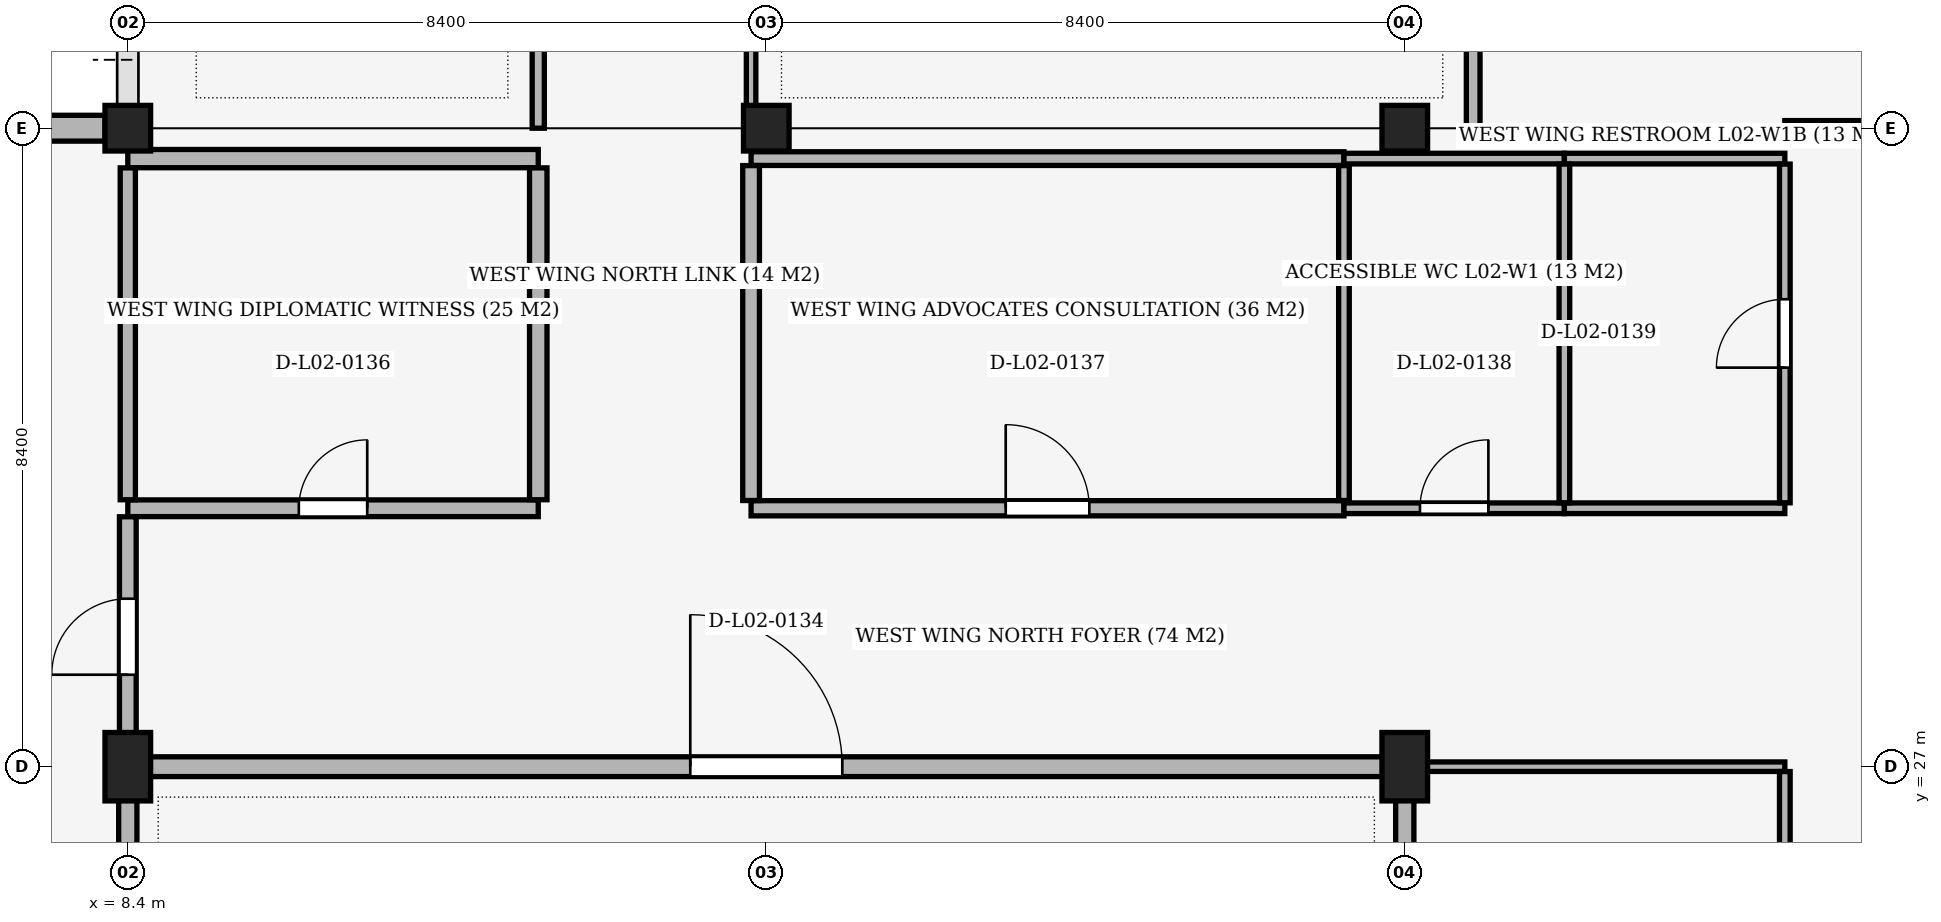
"""IFC4 building model, lengths in metres.
Left out: names, types, materials, properties, quantities, classifications, styles, units other than length and angle.
Written with IfcOpenShell. Run it as: python <this file> out.ifc"""

import sys

from ifc_helpers import new_model, si_unit, direction, frame, frame_2d, origin, origin_2d, place, context, subcontext, project, spatial, rectangle, extrude, element, fill, save


model = new_model("IFC4")
c1 = context("Model", 3, precision=1e-05, world=origin(), true_north=direction((0.0, 1.0)))
c2 = subcontext(c1, "Body", "Model", "MODEL_VIEW")
j1 = project(units=[si_unit("LENGTHUNIT", "METRE"), si_unit("PLANEANGLEUNIT", "RADIAN")], contexts=[c1])
p1 = place(None, origin())
s1 = spatial("IfcSite", under=j1, at=p1, CompositionType="ELEMENT")
p2 = place(p1, origin())
s2 = spatial("IfcBuilding", under=s1, at=p2, CompositionType="ELEMENT")
p3 = place(p2, frame((0.0, 0.0, 10.2)))
s3 = spatial("IfcBuildingStorey", under=s2, at=p3, CompositionType="ELEMENT", Elevation=10.2)
p4 = place(p3, frame((8.4, 27.0, 0.0), z_axis=(0.0, 0.0, 1.0), x_axis=(1.0, 0.0, 0.0)))
e1 = element("IfcColumn", 1, at=p4, inside=s3, PredefinedType="COLUMN", context=c2, shape_type="SweptSolid", body=[
    extrude(rectangle(XDim=0.6, YDim=0.9, at=origin_2d()), origin(), (0.0, 0.0, 1.0), 5.1),
])
for number, where, z_axis, x_axis in (
    (2, (8.4, 35.4, 0.0), (0.0, 0.0, 1.0), (1.0, 0.0, 0.0)),
    (3, (16.8, 35.4, 0.0), (0.0, 0.0, 1.0), (1.0, 0.0, 0.0)),
):
    element("IfcColumn", number, at=place(p3, frame(where, z_axis=z_axis, x_axis=x_axis)), inside=s3, PredefinedType="COLUMN", context=c2, shape_type="SweptSolid", body=[
        extrude(rectangle(XDim=0.6, YDim=0.6, at=origin_2d()), origin(), (0.0, 0.0, 1.0), 5.1),
    ])
p5 = place(p3, frame((25.2, 27.0, 0.0), z_axis=(0.0, 0.0, 1.0), x_axis=(1.0, 0.0, 0.0)))
e4 = element("IfcColumn", 4, at=p5, inside=s3, PredefinedType="COLUMN", context=c2, shape_type="SweptSolid", body=[
    extrude(rectangle(XDim=0.6, YDim=0.9, at=origin_2d()), origin(), (0.0, 0.0, 1.0), 5.1),
])
p6 = place(p3, frame((25.2, 35.4, 0.0), z_axis=(0.0, 0.0, 1.0), x_axis=(1.0, 0.0, 0.0)))
e5 = element("IfcColumn", 5, at=p6, inside=s3, PredefinedType="COLUMN", context=c2, shape_type="SweptSolid", body=[
    extrude(rectangle(XDim=0.6, YDim=0.6, at=origin_2d()), origin(), (0.0, 0.0, 1.0), 5.1),
])
p7 = place(p3, frame((0.3, 35.4, 0.0), z_axis=(0.0, 0.0, 1.0), x_axis=(1.0, 0.0, 0.0)))
e6 = element("IfcWall", 6, at=p7, inside=s3, PredefinedType="SOLIDWALL", context=c2, shape_type="SweptSolid", body=[
    extrude(rectangle(XDim=7.8, YDim=0.34, at=frame_2d((3.9, 0.0))), origin(), (0.0, 0.0, 1.0), 4.12),
])
p8 = place(p7, frame((0.733, 0.0, 0.75)))
e7 = element("IfcOpeningElement", 7, at=p8, cuts=e6, PredefinedType="OPENING", context=c2, shape_type="SweptSolid", body=[
    extrude(rectangle(XDim=2.8, YDim=2.6, at=frame_2d((1.4, 1.3))), frame((0.0, 0.185, 0.0), z_axis=(0.0, -1.0, 0.0), x_axis=(1.0, 0.0, 0.0)), (0.0, 0.0, 1.0), 0.37),
])
p9 = place(p7, frame((4.267, 0.0, 0.75)))
e8 = element("IfcOpeningElement", 8, at=p9, cuts=e6, PredefinedType="OPENING", context=c2, shape_type="SweptSolid", body=[
    extrude(rectangle(XDim=2.8, YDim=2.6, at=frame_2d((1.4, 1.3))), frame((0.0, 0.185, 0.0), z_axis=(0.0, -1.0, 0.0), x_axis=(1.0, 0.0, 0.0)), (0.0, 0.0, 1.0), 0.37),
])
p10 = place(p3, frame((8.4, 27.0, 0.0), z_axis=(0.0, 0.0, 1.0), x_axis=(1.0, 0.0, 0.0)))
e9 = element("IfcWall", 9, at=p10, inside=s3, PredefinedType="PARTITIONING", context=c2, shape_type="SweptSolid", body=[
    extrude(rectangle(XDim=16.8, YDim=0.26, at=frame_2d((8.4, 0.0))), origin(), (0.0, 0.0, 1.0), 3.57),
])
p11 = place(p10, frame((7.4, 0.0, 0.0)))
e10 = element("IfcOpeningElement", 10, at=p11, cuts=e9, PredefinedType="OPENING", context=c2, shape_type="SweptSolid", body=[
    extrude(rectangle(XDim=2.0, YDim=2.5, at=frame_2d((1.0, 1.25))), frame((0.0, 0.145, 0.0), z_axis=(0.0, -1.0, 0.0), x_axis=(1.0, 0.0, 0.0)), (0.0, 0.0, 1.0), 0.29),
])
p12 = place(p3, frame((25.2, 27.0, 0.0), z_axis=(0.0, 0.0, 1.0), x_axis=(1.0, 0.0, 0.0)))
e11 = element("IfcWall", 11, at=p12, inside=s3, PredefinedType="PARTITIONING", context=c2, shape_type="SweptSolid", body=[
    extrude(rectangle(XDim=5.0, YDim=0.125, at=frame_2d((2.5, 0.0))), origin(), (0.0, 0.0, 1.0), 3.57),
])
p13 = place(p3, frame((8.4, 30.4, 0.0), z_axis=(0.0, 0.0, 1.0), x_axis=(1.0, 0.0, 0.0)))
e12 = element("IfcWall", 12, at=p13, inside=s3, PredefinedType="PARTITIONING", context=c2, shape_type="SweptSolid", body=[
    extrude(rectangle(XDim=5.4, YDim=0.22, at=frame_2d((2.7, 0.0))), origin(), (0.0, 0.0, 1.0), 4.12),
])
p14 = place(p13, frame((2.25, 0.0, 0.0)))
e13 = element("IfcOpeningElement", 13, at=p14, cuts=e12, PredefinedType="OPENING", context=c2, shape_type="SweptSolid", body=[
    extrude(rectangle(XDim=0.9, YDim=2.2, at=frame_2d((0.45, 1.1))), frame((0.0, 0.125, 0.0), z_axis=(0.0, -1.0, 0.0), x_axis=(1.0, 0.0, 0.0)), (0.0, 0.0, 1.0), 0.25),
])
p15 = place(p3, frame((16.6, 30.4, 0.0), z_axis=(0.0, 0.0, 1.0), x_axis=(1.0, 0.0, 0.0)))
e14 = element("IfcWall", 14, at=p15, inside=s3, PredefinedType="PARTITIONING", context=c2, shape_type="SweptSolid", body=[
    extrude(rectangle(XDim=7.8, YDim=0.2, at=frame_2d((3.9, 0.0))), origin(), (0.0, 0.0, 1.0), 4.82),
])
p16 = place(p15, frame((3.35, 0.0, 0.0)))
e15 = element("IfcOpeningElement", 15, at=p16, cuts=e14, PredefinedType="OPENING", context=c2, shape_type="SweptSolid", body=[
    extrude(rectangle(XDim=1.1, YDim=2.2, at=frame_2d((0.55, 1.1))), frame((0.0, 0.115, 0.0), z_axis=(0.0, -1.0, 0.0), x_axis=(1.0, 0.0, 0.0)), (0.0, 0.0, 1.0), 0.23),
])
p17 = place(p3, frame((24.4, 30.4, 0.0), z_axis=(0.0, 0.0, 1.0), x_axis=(1.0, 0.0, 0.0)))
e16 = element("IfcWall", 16, at=p17, inside=s3, PredefinedType="PARTITIONING", context=c2, shape_type="SweptSolid", body=[
    extrude(rectangle(XDim=2.9, YDim=0.14, at=frame_2d((1.45, 0.0))), origin(), (0.0, 0.0, 1.0), 4.12),
])
p18 = place(p17, frame((1.0, 0.0, 0.0)))
e17 = element("IfcOpeningElement", 17, at=p18, cuts=e16, PredefinedType="OPENING", context=c2, shape_type="SweptSolid", body=[
    extrude(rectangle(XDim=0.9, YDim=2.1, at=frame_2d((0.45, 1.05))), frame((0.0, 0.085, 0.0), z_axis=(0.0, -1.0, 0.0), x_axis=(1.0, 0.0, 0.0)), (0.0, 0.0, 1.0), 0.17),
])
p19 = place(p3, frame((27.3, 30.4, 0.0), z_axis=(0.0, 0.0, 1.0), x_axis=(1.0, 0.0, 0.0)))
e18 = element("IfcWall", 18, at=p19, inside=s3, PredefinedType="PARTITIONING", context=c2, shape_type="SweptSolid", body=[
    extrude(rectangle(XDim=2.9, YDim=0.14, at=frame_2d((1.45, 0.0))), origin(), (0.0, 0.0, 1.0), 4.82),
])
p20 = place(p3, frame((8.4, 35.0, 0.0), z_axis=(0.0, 0.0, 1.0), x_axis=(1.0, 0.0, 0.0)))
e19 = element("IfcWall", 19, at=p20, inside=s3, PredefinedType="PARTITIONING", context=c2, shape_type="SweptSolid", body=[
    extrude(rectangle(XDim=5.4, YDim=0.24, at=frame_2d((2.7, 0.0))), origin(), (0.0, 0.0, 1.0), 4.12),
])
p21 = place(p3, frame((16.6, 35.0, 0.0), z_axis=(0.0, 0.0, 1.0), x_axis=(1.0, 0.0, 0.0)))
e20 = element("IfcWall", 20, at=p21, inside=s3, PredefinedType="PARTITIONING", context=c2, shape_type="SweptSolid", body=[
    extrude(rectangle(XDim=7.8, YDim=0.18, at=frame_2d((3.9, 0.0))), origin(), (0.0, 0.0, 1.0), 4.82),
])
p22 = place(p3, frame((24.4, 35.0, 0.0), z_axis=(0.0, 0.0, 1.0), x_axis=(1.0, 0.0, 0.0)))
e21 = element("IfcWall", 21, at=p22, inside=s3, PredefinedType="PARTITIONING", context=c2, shape_type="SweptSolid", body=[
    extrude(rectangle(XDim=2.9, YDim=0.14, at=frame_2d((1.45, 0.0))), origin(), (0.0, 0.0, 1.0), 4.12),
])
p23 = place(p3, frame((27.3, 35.0, 0.0), z_axis=(0.0, 0.0, 1.0), x_axis=(1.0, 0.0, 0.0)))
e22 = element("IfcWall", 22, at=p23, inside=s3, PredefinedType="PARTITIONING", context=c2, shape_type="SweptSolid", body=[
    extrude(rectangle(XDim=2.9, YDim=0.14, at=frame_2d((1.45, 0.0))), origin(), (0.0, 0.0, 1.0), 4.82),
])
p24 = place(p3, frame((30.2, 35.4, 0.0), z_axis=(0.0, 0.0, 1.0), x_axis=(1.0, 0.0, 0.0)))
e23 = element("IfcWall", 23, at=p24, inside=s3, PredefinedType="PARTITIONING", context=c2, shape_type="SweptSolid", body=[
    extrude(rectangle(XDim=3.4, YDim=0.2, at=frame_2d((1.7, 0.0))), origin(), (0.0, 0.0, 1.0), 4.12),
])
p25 = place(p3, frame((8.4, 5.522, 0.0), z_axis=(0.0, 0.0, 1.0), x_axis=(0.0, 1.0, 0.0)))
e24 = element("IfcWall", 24, at=p25, inside=s3, PredefinedType="PARTITIONING", context=c2, shape_type="SweptSolid", body=[
    extrude(rectangle(XDim=21.346, YDim=0.24, at=frame_2d((10.673, 0.0))), origin(), (0.0, 0.0, 1.0), 3.57),
])
p26 = place(p3, frame((8.4, 27.132, 0.0), z_axis=(0.0, 0.0, 1.0), x_axis=(0.0, 1.0, 0.0)))
e25 = element("IfcWall", 25, at=p26, inside=s3, PredefinedType="PARTITIONING", context=c2, shape_type="SweptSolid", body=[
    extrude(rectangle(XDim=3.156, YDim=0.22, at=frame_2d((1.578, 0.0))), origin(), (0.0, 0.0, 1.0), 3.67),
])
p27 = place(p26, frame((1.078, 0.0, 0.0)))
e26 = element("IfcOpeningElement", 26, at=p27, cuts=e25, PredefinedType="OPENING", context=c2, shape_type="SweptSolid", body=[
    extrude(rectangle(XDim=1.0, YDim=2.1, at=frame_2d((0.5, 1.05))), frame((0.0, 0.125, 0.0), z_axis=(0.0, -1.0, 0.0), x_axis=(1.0, 0.0, 0.0)), (0.0, 0.0, 1.0), 0.25),
])
p28 = place(p3, frame((8.4, 30.512, 0.0), z_axis=(0.0, 0.0, 1.0), x_axis=(0.0, 1.0, 0.0)))
e27 = element("IfcWall", 27, at=p28, inside=s3, PredefinedType="PARTITIONING", context=c2, shape_type="SweptSolid", body=[
    extrude(rectangle(XDim=4.366, YDim=0.2, at=frame_2d((2.183, 0.0))), origin(), (0.0, 0.0, 1.0), 4.12),
])
p29 = place(p3, frame((13.8, 30.512, 0.0), z_axis=(0.0, 0.0, 1.0), x_axis=(0.0, 1.0, 0.0)))
e28 = element("IfcWall", 28, at=p29, inside=s3, PredefinedType="SOLIDWALL", context=c2, shape_type="SweptSolid", body=[
    extrude(rectangle(XDim=4.366, YDim=0.23, at=frame_2d((2.183, 0.0))), origin(), (0.0, 0.0, 1.0), 4.82),
])
p30 = place(p3, frame((13.8, 35.4, 0.0), z_axis=(0.0, 0.0, 1.0), x_axis=(0.0, 1.0, 0.0)))
e29 = element("IfcWall", 29, at=p30, inside=s3, PredefinedType="PARTITIONING", context=c2, shape_type="SweptSolid", body=[
    extrude(rectangle(XDim=64.068, YDim=0.16, at=frame_2d((32.034, 0.0))), origin(), (0.0, 0.0, 1.0), 4.12),
])
p31 = place(p30, frame((31.234, 0.0, 0.0)))
e30 = element("IfcOpeningElement", 30, at=p31, cuts=e29, PredefinedType="OPENING", context=c2, shape_type="SweptSolid", body=[
    extrude(rectangle(XDim=1.6, YDim=2.3, at=frame_2d((0.8, 1.15))), frame((0.0, 0.095, 0.0), z_axis=(0.0, -1.0, 0.0), x_axis=(1.0, 0.0, 0.0)), (0.0, 0.0, 1.0), 0.19),
])
p32 = place(p3, frame((16.6, 30.502, 0.0), z_axis=(0.0, 0.0, 1.0), x_axis=(0.0, 1.0, 0.0)))
e31 = element("IfcWall", 31, at=p32, inside=s3, PredefinedType="PARTITIONING", context=c2, shape_type="SweptSolid", body=[
    extrude(rectangle(XDim=4.406, YDim=0.22, at=frame_2d((2.203, 0.0))), origin(), (0.0, 0.0, 1.0), 4.82),
])
p33 = place(p3, frame((16.6, 35.4, 0.0), z_axis=(0.0, 0.0, 1.0), x_axis=(0.0, 1.0, 0.0)))
e32 = element("IfcWall", 32, at=p33, inside=s3, PredefinedType="PARTITIONING", context=c2, shape_type="SweptSolid", body=[
    extrude(rectangle(XDim=10.098, YDim=0.125, at=frame_2d((5.049, 0.0))), origin(), (0.0, 0.0, 1.0), 4.12),
])
p34 = place(p33, frame((2.249, 0.0, 0.0)))
e33 = element("IfcOpeningElement", 33, at=p34, cuts=e32, PredefinedType="OPENING", context=c2, shape_type="SweptSolid", body=[
    extrude(rectangle(XDim=1.6, YDim=2.3, at=frame_2d((0.8, 1.15))), frame((0.0, 0.077, 0.0), z_axis=(0.0, -1.0, 0.0), x_axis=(1.0, 0.0, 0.0)), (0.0, 0.0, 1.0), 0.155),
])
p35 = place(p3, frame((24.4, 30.502, 0.0), z_axis=(0.0, 0.0, 1.0), x_axis=(0.0, 1.0, 0.0)))
e34 = element("IfcWall", 34, at=p35, inside=s3, PredefinedType="PARTITIONING", context=c2, shape_type="SweptSolid", body=[
    extrude(rectangle(XDim=4.406, YDim=0.14, at=frame_2d((2.203, 0.0))), origin(), (0.0, 0.0, 1.0), 4.82),
])
p36 = place(p3, frame((25.2, 5.522, 0.0), z_axis=(0.0, 0.0, 1.0), x_axis=(0.0, 1.0, 0.0)))
e35 = element("IfcWall", 35, at=p36, inside=s3, PredefinedType="PARTITIONING", context=c2, shape_type="SweptSolid", body=[
    extrude(rectangle(XDim=21.346, YDim=0.24, at=frame_2d((10.673, 0.0))), origin(), (0.0, 0.0, 1.0), 3.57),
])
p37 = place(p3, frame((26.1, 35.4, 0.0), z_axis=(0.0, 0.0, 1.0), x_axis=(0.0, 1.0, 0.0)))
e36 = element("IfcWall", 36, at=p37, inside=s3, PredefinedType="PARTITIONING", context=c2, shape_type="SweptSolid", body=[
    extrude(rectangle(XDim=3.668, YDim=0.18, at=frame_2d((1.834, 0.0))), origin(), (0.0, 0.0, 1.0), 4.12),
])
p38 = place(p3, frame((27.3, 30.472, 0.0), z_axis=(0.0, 0.0, 1.0), x_axis=(0.0, 1.0, 0.0)))
e37 = element("IfcWall", 37, at=p38, inside=s3, PredefinedType="PARTITIONING", context=c2, shape_type="SweptSolid", body=[
    extrude(rectangle(XDim=4.456, YDim=0.14, at=frame_2d((2.228, 0.0))), origin(), (0.0, 0.0, 1.0), 4.37),
])
p39 = place(p3, frame((30.2, 0.172, 0.0), z_axis=(0.0, 0.0, 1.0), x_axis=(0.0, 1.0, 0.0)))
e38 = element("IfcWall", 38, at=p39, inside=s3, PredefinedType="PARTITIONING", context=c2, shape_type="SweptSolid", body=[
    extrude(rectangle(XDim=26.764, YDim=0.14, at=frame_2d((13.382, 0.0))), origin(), (0.0, 0.0, 1.0), 4.12),
])
p40 = place(p39, frame((12.757, 0.0, 0.0)))
e39 = element("IfcOpeningElement", 39, at=p40, cuts=e38, PredefinedType="OPENING", context=c2, shape_type="SweptSolid", body=[
    extrude(rectangle(XDim=1.25, YDim=2.2, at=frame_2d((0.625, 1.1))), frame((0.0, 0.085, 0.0), z_axis=(0.0, -1.0, 0.0), x_axis=(1.0, 0.0, 0.0)), (0.0, 0.0, 1.0), 0.17),
])
p41 = place(p3, frame((30.2, 30.472, 0.0), z_axis=(0.0, 0.0, 1.0), x_axis=(0.0, 1.0, 0.0)))
e40 = element("IfcWall", 40, at=p41, inside=s3, PredefinedType="PARTITIONING", context=c2, shape_type="SweptSolid", body=[
    extrude(rectangle(XDim=4.456, YDim=0.14, at=frame_2d((2.228, 0.0))), origin(), (0.0, 0.0, 1.0), 4.37),
])
p42 = place(p41, frame((1.778, 0.0, 0.0)))
e41 = element("IfcOpeningElement", 41, at=p42, cuts=e40, PredefinedType="OPENING", context=c2, shape_type="SweptSolid", body=[
    extrude(rectangle(XDim=0.9, YDim=2.1, at=frame_2d((0.45, 1.05))), frame((0.0, 0.085, 0.0), z_axis=(0.0, -1.0, 0.0), x_axis=(1.0, 0.0, 0.0)), (0.0, 0.0, 1.0), 0.17),
])
p43 = place(p27, origin())
e42 = element("IfcDoor", 42, at=p43, inside=s3, OperationType="SINGLE_SWING_LEFT", PredefinedType="DOOR", context=c2, shape_type="SweptSolid", body=[
    extrude(rectangle(XDim=1.0, YDim=2.1, at=frame_2d((0.5, 1.05))), frame((0.0, 0.025, 0.0), z_axis=(0.0, -1.0, 0.0), x_axis=(1.0, 0.0, 0.0)), (0.0, 0.0, 1.0), 0.05),
])
fill(e26, e42)
p44 = place(p11, origin())
e43 = element("IfcDoor", 43, at=p44, inside=s3, OperationType="SINGLE_SWING_LEFT", PredefinedType="DOOR", context=c2, shape_type="SweptSolid", body=[
    extrude(rectangle(XDim=2.0, YDim=2.5, at=frame_2d((1.0, 1.25))), frame((0.0, 0.025, 0.0), z_axis=(0.0, -1.0, 0.0), x_axis=(1.0, 0.0, 0.0)), (0.0, 0.0, 1.0), 0.05),
])
fill(e10, e43)
p45 = place(p14, origin())
e44 = element("IfcDoor", 44, at=p45, inside=s3, OperationType="SINGLE_SWING_RIGHT", PredefinedType="DOOR", context=c2, shape_type="SweptSolid", body=[
    extrude(rectangle(XDim=0.9, YDim=2.2, at=frame_2d((0.45, 1.1))), frame((0.0, 0.025, 0.0), z_axis=(0.0, -1.0, 0.0), x_axis=(1.0, 0.0, 0.0)), (0.0, 0.0, 1.0), 0.05),
])
fill(e13, e44)
p46 = place(p16, origin())
e45 = element("IfcDoor", 45, at=p46, inside=s3, OperationType="SINGLE_SWING_LEFT", PredefinedType="DOOR", context=c2, shape_type="SweptSolid", body=[
    extrude(rectangle(XDim=1.1, YDim=2.2, at=frame_2d((0.55, 1.1))), frame((0.0, 0.025, 0.0), z_axis=(0.0, -1.0, 0.0), x_axis=(1.0, 0.0, 0.0)), (0.0, 0.0, 1.0), 0.05),
])
fill(e15, e45)
p47 = place(p18, origin())
e46 = element("IfcDoor", 46, at=p47, inside=s3, OperationType="SINGLE_SWING_RIGHT", PredefinedType="DOOR", context=c2, shape_type="SweptSolid", body=[
    extrude(rectangle(XDim=0.9, YDim=2.1, at=frame_2d((0.45, 1.05))), frame((0.0, 0.025, 0.0), z_axis=(0.0, -1.0, 0.0), x_axis=(1.0, 0.0, 0.0)), (0.0, 0.0, 1.0), 0.05),
])
fill(e17, e46)
p48 = place(p42, origin())
e47 = element("IfcDoor", 47, at=p48, inside=s3, OperationType="SINGLE_SWING_LEFT", PredefinedType="DOOR", context=c2, shape_type="SweptSolid", body=[
    extrude(rectangle(XDim=0.9, YDim=2.1, at=frame_2d((0.45, 1.05))), frame((0.0, 0.025, 0.0), z_axis=(0.0, -1.0, 0.0), x_axis=(1.0, 0.0, 0.0)), (0.0, 0.0, 1.0), 0.05),
])
fill(e41, e47)
save(model, sys.argv[1])
